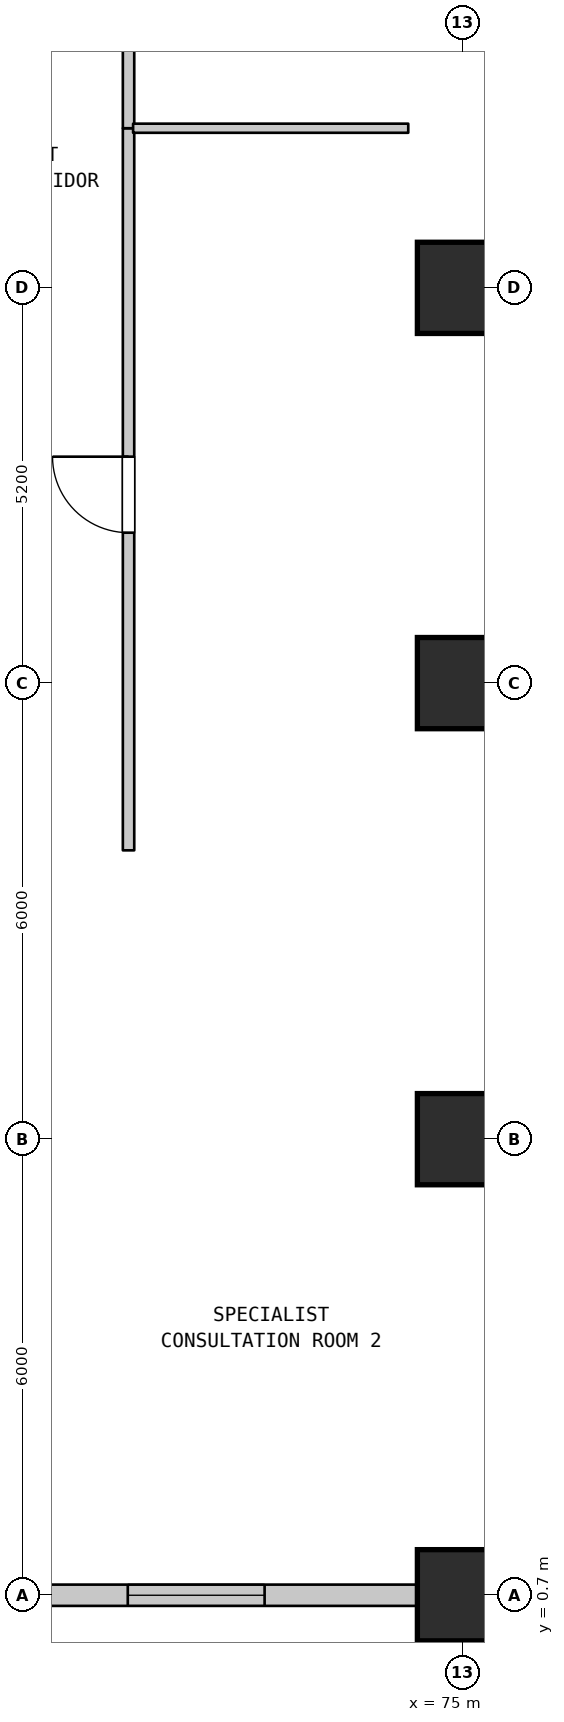
"""IFC4 building model, lengths in metres.
Left out: names, types, materials, properties, quantities, classifications, styles, units other than length and angle.
Written with IfcOpenShell. Run it as: python <this file> out.ifc"""

import sys

from ifc_helpers import new_model, si_unit, direction, frame, frame_2d, origin, origin_2d, place, context, subcontext, project, spatial, rectangle, extrude, element, fill, save


model = new_model("IFC4")
c1 = context("Model", 3, precision=1e-05, world=origin(), true_north=direction((0.0, 1.0)))
c2 = subcontext(c1, "Body", "Model", "MODEL_VIEW")
j1 = project(units=[si_unit("LENGTHUNIT", "METRE"), si_unit("PLANEANGLEUNIT", "RADIAN")], contexts=[c1])
p1 = place(None, origin())
s1 = spatial("IfcSite", under=j1, at=p1, CompositionType="ELEMENT")
p2 = place(p1, origin())
s2 = spatial("IfcBuilding", under=s1, at=p2, CompositionType="ELEMENT")
p3 = place(p2, frame((0.0, 0.0, 6.5)))
s3 = spatial("IfcBuildingStorey", under=s2, at=p3, CompositionType="ELEMENT", Elevation=6.5)
for number, where, z_axis, x_axis in (
    (1, (75.0, 0.7, 0.0), (0.0, 0.0, 1.0), (1.0, 0.0, 0.0)),
    (2, (75.0, 6.7, 0.0), (0.0, 0.0, 1.0), (1.0, 0.0, 0.0)),
    (3, (75.0, 12.7, 0.0), (0.0, 0.0, 1.0), (1.0, 0.0, 0.0)),
    (4, (75.0, 17.9, 0.0), (0.0, 0.0, 1.0), (1.0, 0.0, 0.0)),
):
    element("IfcColumn", number, at=place(p3, frame(where, z_axis=z_axis, x_axis=x_axis)), inside=s3, PredefinedType="PILASTER", context=c2, shape_type="SweptSolid", body=[
        extrude(rectangle(XDim=1.2, YDim=1.2, at=origin_2d()), origin(), (0.0, 0.0, 1.0), 6.5),
    ])
p4 = place(p3, frame((76.707, 2.407, 0.0), z_axis=(0.0, 0.0, 1.0), x_axis=(-0.707106781187, -0.707106781187, 0.0)))
e5 = element("IfcWall", 5, at=p4, inside=s3, PredefinedType="STANDARD", context=c2, shape_type="SweptSolid", body=[
    extrude(rectangle(XDim=2.0, YDim=0.28, at=frame_2d((1.0, 0.0))), origin(), (0.0, 0.0, 1.0), 6.17),
])
p5 = place(p3, frame((75.293, 0.993, 0.0), z_axis=(0.0, 0.0, 1.0), x_axis=(-0.92383017907, -0.382802560388, 0.0)))
e6 = element("IfcWall", 6, at=p5, inside=s3, PredefinedType="STANDARD", context=c2, shape_type="SweptSolid", body=[
    extrude(rectangle(XDim=0.765, YDim=0.28, at=frame_2d((0.383, 0.0))), origin(), (0.0, 0.0, 1.0), 6.17),
])
p6 = place(p3, frame((74.586, 0.7, 0.0), z_axis=(0.0, 0.0, 1.0), x_axis=(-1.0, 0.0, 0.0)))
e7 = element("IfcWall", 7, at=p6, inside=s3, PredefinedType="STANDARD", context=c2, shape_type="SweptSolid", body=[
    extrude(rectangle(XDim=11.586, YDim=0.28, at=frame_2d((5.793, 0.0))), origin(), (0.0, 0.0, 1.0), 6.17),
])
p7 = place(p6, frame((2.196, 0.0, 0.95)))
e8 = element("IfcOpeningElement", 8, at=p7, cuts=e7, PredefinedType="OPENING", context=c2, shape_type="SweptSolid", body=[
    extrude(rectangle(XDim=1.8, YDim=1.8, at=frame_2d((0.9, 0.9))), frame((0.0, 0.15, 0.0), z_axis=(0.0, -1.0, 0.0), x_axis=(1.0, 0.0, 0.0)), (0.0, 0.0, 1.0), 0.3),
])
p8 = place(p6, frame((7.589, 0.0, 0.95)))
e9 = element("IfcOpeningElement", 9, at=p8, cuts=e7, PredefinedType="OPENING", context=c2, shape_type="SweptSolid", body=[
    extrude(rectangle(XDim=1.8, YDim=1.8, at=frame_2d((0.9, 0.9))), frame((0.0, 0.15, 0.0), z_axis=(0.0, -1.0, 0.0), x_axis=(1.0, 0.0, 0.0)), (0.0, 0.0, 1.0), 0.3),
])
p9 = place(p3, frame((70.6, 10.5, 0.0), z_axis=(0.0, 0.0, 1.0), x_axis=(0.0, 1.0, 0.0)))
e10 = element("IfcWall", 10, at=p9, inside=s3, PredefinedType="STANDARD", context=c2, shape_type="SweptSolid", body=[
    extrude(rectangle(XDim=9.5, YDim=0.15, at=frame_2d((4.75, 0.0))), origin(), (0.0, 0.0, 1.0), 6.17),
])
p10 = place(p9, frame((4.179, 0.0, 0.0)))
e11 = element("IfcOpeningElement", 11, at=p10, cuts=e10, PredefinedType="OPENING", context=c2, shape_type="SweptSolid", body=[
    extrude(rectangle(XDim=1.0, YDim=2.15, at=frame_2d((0.5, 1.075))), frame((0.0, 0.085, 0.0), z_axis=(0.0, -1.0, 0.0), x_axis=(1.0, 0.0, 0.0)), (0.0, 0.0, 1.0), 0.17),
])
p11 = place(p3, frame((70.6, 20.0, 0.0), z_axis=(0.0, 0.0, 1.0), x_axis=(0.0, 1.0, 0.0)))
e12 = element("IfcWall", 12, at=p11, inside=s3, PredefinedType="STANDARD", context=c2, shape_type="SweptSolid", body=[
    extrude(rectangle(XDim=9.5, YDim=0.15, at=frame_2d((4.75, 0.0))), origin(), (0.0, 0.0, 1.0), 6.17),
])
p12 = place(p11, frame((4.229, 0.0, 0.0)))
e13 = element("IfcOpeningElement", 13, at=p12, cuts=e12, PredefinedType="OPENING", context=c2, shape_type="SweptSolid", body=[
    extrude(rectangle(XDim=1.0, YDim=2.15, at=frame_2d((0.5, 1.075))), frame((0.0, 0.085, 0.0), z_axis=(0.0, -1.0, 0.0), x_axis=(1.0, 0.0, 0.0)), (0.0, 0.0, 1.0), 0.17),
])
p13 = place(p3, frame((70.66, 20.0, 0.0), z_axis=(0.0, 0.0, 1.0), x_axis=(1.0, 0.0, 0.0)))
e14 = element("IfcWall", 14, at=p13, inside=s3, PredefinedType="PARTITIONING", context=c2, shape_type="SweptSolid", body=[
    extrude(rectangle(XDim=3.62, YDim=0.12, at=frame_2d((1.81, 0.0))), origin(), (0.0, 0.0, 1.0), 6.17),
])
p14 = place(p7, origin())
e15 = element("IfcWindow", 15, at=p14, inside=s3, PartitioningType="DOUBLE_PANEL_VERTICAL", PredefinedType="WINDOW", context=c2, shape_type="SweptSolid", body=[
    extrude(rectangle(XDim=1.8, YDim=1.8, at=frame_2d((0.9, 0.9))), frame((0.0, 0.03, 0.0), z_axis=(0.0, -1.0, 0.0), x_axis=(1.0, 0.0, 0.0)), (0.0, 0.0, 1.0), 0.06),
])
fill(e8, e15)
p15 = place(p10, origin())
e16 = element("IfcDoor", 16, at=p15, inside=s3, OperationType="SINGLE_SWING_RIGHT", PredefinedType="DOOR", context=c2, shape_type="SweptSolid", body=[
    extrude(rectangle(XDim=1.0, YDim=2.15, at=frame_2d((0.5, 1.075))), frame((0.0, 0.025, 0.0), z_axis=(0.0, -1.0, 0.0), x_axis=(1.0, 0.0, 0.0)), (0.0, 0.0, 1.0), 0.05),
])
fill(e11, e16)
save(model, sys.argv[1])
